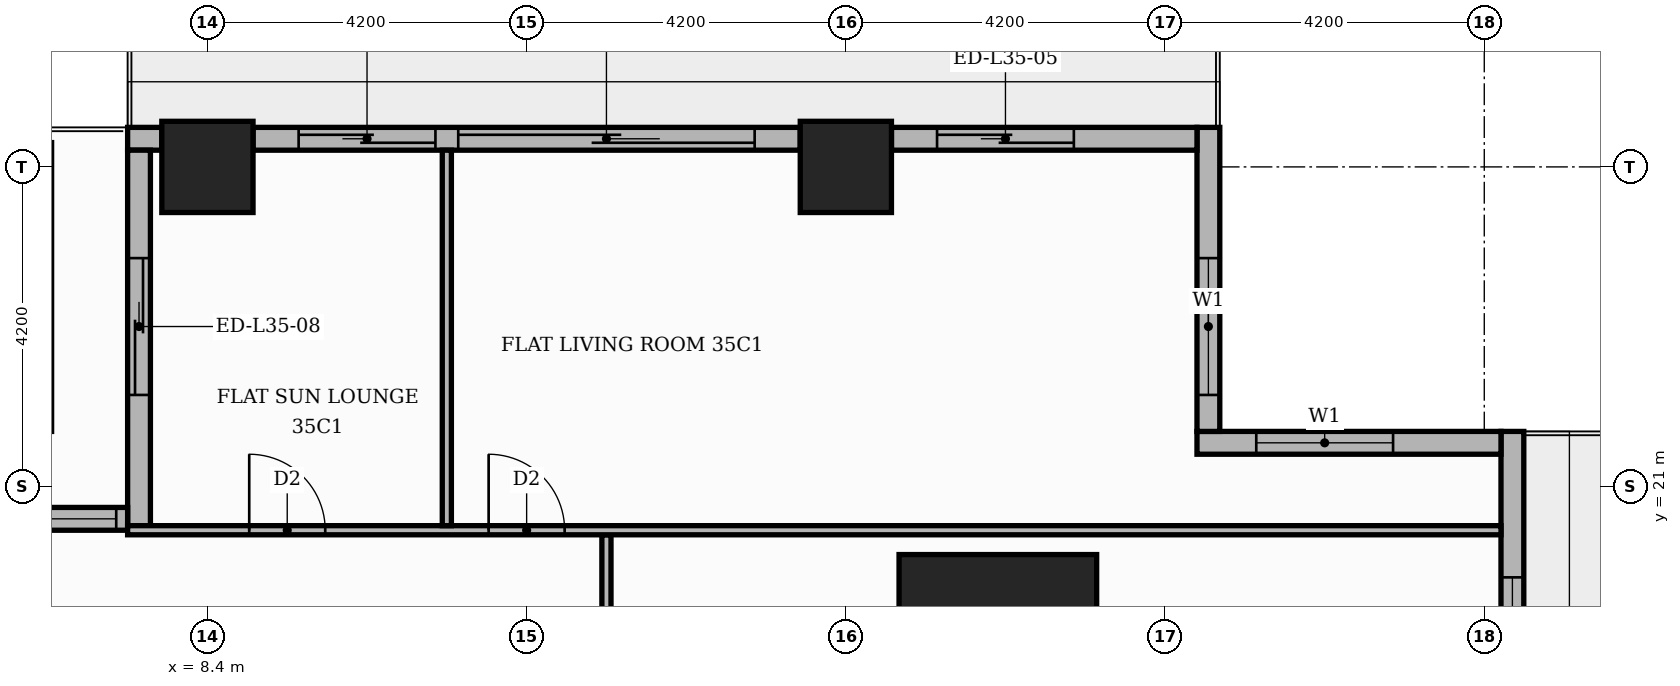
"""IFC4 building model, lengths in metres.
Left out: names, types, materials, properties, quantities, classifications, styles, units other than length and angle.
Written with IfcOpenShell. Run it as: python <this file> out.ifc"""

import sys

from ifc_helpers import new_model, si_unit, direction, frame, frame_2d, origin, origin_2d, place, context, subcontext, project, spatial, rectangle, extrude, element, fill, save


model = new_model("IFC4")
c1 = context("Model", 3, precision=1e-05, world=origin(), true_north=direction((0.0, 1.0)))
c2 = subcontext(c1, "Body", "Model", "MODEL_VIEW")
j1 = project(units=[si_unit("LENGTHUNIT", "METRE"), si_unit("PLANEANGLEUNIT", "RADIAN")], contexts=[c1])
p1 = place(None, origin())
s1 = spatial("IfcSite", under=j1, at=p1, CompositionType="ELEMENT")
p2 = place(p1, origin())
s2 = spatial("IfcBuilding", under=s1, at=p2, CompositionType="ELEMENT")
p3 = place(p2, frame((0.0, 0.0, 149.4)))
s3 = spatial("IfcBuildingStorey", under=s2, at=p3, CompositionType="ELEMENT", Elevation=149.4)
p4 = place(p3, frame((18.8, 18.8, 0.0), z_axis=(0.0, 0.0, 1.0), x_axis=(1.0, 0.0, 0.0)))
e1 = element("IfcColumn", 1, at=p4, inside=s3, PredefinedType="COLUMN", context=c2, shape_type="SweptSolid", body=[
    extrude(rectangle(XDim=2.6, YDim=2.6, at=origin_2d()), origin(), (0.0, 0.0, 1.0), 3.9),
])
for number, where, z_axis, x_axis in (
    (2, (8.4, 25.2, 0.0), (0.0, 0.0, 1.0), (1.0, 0.0, 0.0)),
    (3, (16.8, 25.2, 0.0), (0.0, 0.0, 1.0), (1.0, 0.0, 0.0)),
):
    element("IfcColumn", number, at=place(p3, frame(where, z_axis=z_axis, x_axis=x_axis)), inside=s3, PredefinedType="COLUMN", context=c2, shape_type="SweptSolid", body=[
        extrude(rectangle(XDim=1.2, YDim=1.2, at=origin_2d()), origin(), (0.0, 0.0, 1.0), 3.9),
    ])
p5 = place(p3, frame((25.57, 17.4, 0.0), z_axis=(0.0, 0.0, 1.0), x_axis=(0.0, 1.0, 0.0)))
e4 = element("IfcWall", 4, at=p5, inside=s3, PredefinedType="STANDARD", context=c2, shape_type="SweptSolid", body=[
    extrude(rectangle(XDim=4.32, YDim=0.3, at=frame_2d((2.16, 0.0))), origin(), (0.0, 0.0, 1.0), 3.48),
])
p6 = place(p5, frame((0.6, 0.0, 0.9)))
e5 = element("IfcOpeningElement", 5, at=p6, cuts=e4, PredefinedType="OPENING", context=c2, shape_type="SweptSolid", body=[
    extrude(rectangle(XDim=1.8, YDim=2.1, at=frame_2d((0.9, 1.05))), frame((0.0, 0.16, 0.0), z_axis=(0.0, -1.0, 0.0), x_axis=(1.0, 0.0, 0.0)), (0.0, 0.0, 1.0), 0.32),
])
p7 = place(p3, frame((25.42, 21.57, 0.0), z_axis=(0.0, 0.0, 1.0), x_axis=(-1.0, 0.0, 0.0)))
e6 = element("IfcWall", 6, at=p7, inside=s3, PredefinedType="STANDARD", context=c2, shape_type="SweptSolid", body=[
    extrude(rectangle(XDim=4.0, YDim=0.3, at=frame_2d((2.0, 0.0))), origin(), (0.0, 0.0, 1.0), 3.48),
])
p8 = place(p7, frame((1.42, 0.0, 0.9)))
e7 = element("IfcOpeningElement", 7, at=p8, cuts=e6, PredefinedType="OPENING", context=c2, shape_type="SweptSolid", body=[
    extrude(rectangle(XDim=1.8, YDim=2.1, at=frame_2d((0.9, 1.05))), frame((0.0, 0.16, 0.0), z_axis=(0.0, -1.0, 0.0), x_axis=(1.0, 0.0, 0.0)), (0.0, 0.0, 1.0), 0.32),
])
p9 = place(p3, frame((21.57, 21.72, 0.0), z_axis=(0.0, 0.0, 1.0), x_axis=(0.0, 1.0, 0.0)))
e8 = element("IfcWall", 8, at=p9, inside=s3, PredefinedType="STANDARD", context=c2, shape_type="SweptSolid", body=[
    extrude(rectangle(XDim=4.0, YDim=0.3, at=frame_2d((2.0, 0.0))), origin(), (0.0, 0.0, 1.0), 3.48),
])
p10 = place(p9, frame((0.48, 0.0, 0.9)))
e9 = element("IfcOpeningElement", 9, at=p10, cuts=e8, PredefinedType="OPENING", context=c2, shape_type="SweptSolid", body=[
    extrude(rectangle(XDim=1.8, YDim=2.1, at=frame_2d((0.9, 1.05))), frame((0.0, 0.16, 0.0), z_axis=(0.0, -1.0, 0.0), x_axis=(1.0, 0.0, 0.0)), (0.0, 0.0, 1.0), 0.32),
])
p11 = place(p3, frame((21.42, 25.57, 0.0), z_axis=(0.0, 0.0, 1.0), x_axis=(-1.0, 0.0, 0.0)))
e10 = element("IfcWall", 10, at=p11, inside=s3, PredefinedType="STANDARD", context=c2, shape_type="SweptSolid", body=[
    extrude(rectangle(XDim=4.02, YDim=0.3, at=frame_2d((2.01, 0.0))), origin(), (0.0, 0.0, 1.0), 3.48),
])
p12 = place(p11, frame((1.62, 0.0, 0.0)))
e11 = element("IfcOpeningElement", 11, at=p12, cuts=e10, PredefinedType="OPENING", context=c2, shape_type="SweptSolid", body=[
    extrude(rectangle(XDim=1.8, YDim=2.4, at=frame_2d((0.9, 1.2))), frame((0.0, 0.16, 0.0), z_axis=(0.0, -1.0, 0.0), x_axis=(1.0, 0.0, 0.0)), (0.0, 0.0, 1.0), 0.32),
])
p13 = place(p3, frame((16.2, 25.57, 0.0), z_axis=(0.0, 0.0, 1.0), x_axis=(-1.0, 0.0, 0.0)))
e12 = element("IfcWall", 12, at=p13, inside=s3, PredefinedType="STANDARD", context=c2, shape_type="SweptSolid", body=[
    extrude(rectangle(XDim=7.2, YDim=0.3, at=frame_2d((3.6, 0.0))), origin(), (0.0, 0.0, 1.0), 3.48),
])
p14 = place(p13, frame((0.6, 0.0, 0.0)))
e13 = element("IfcOpeningElement", 13, at=p14, cuts=e12, PredefinedType="OPENING", context=c2, shape_type="SweptSolid", body=[
    extrude(rectangle(XDim=3.9, YDim=2.4, at=frame_2d((1.95, 1.2))), frame((0.0, 0.16, 0.0), z_axis=(0.0, -1.0, 0.0), x_axis=(1.0, 0.0, 0.0)), (0.0, 0.0, 1.0), 0.32),
])
p15 = place(p13, frame((4.8, 0.0, 0.0)))
e14 = element("IfcOpeningElement", 14, at=p15, cuts=e12, PredefinedType="OPENING", context=c2, shape_type="SweptSolid", body=[
    extrude(rectangle(XDim=1.8, YDim=2.4, at=frame_2d((0.9, 1.2))), frame((0.0, 0.16, 0.0), z_axis=(0.0, -1.0, 0.0), x_axis=(1.0, 0.0, 0.0)), (0.0, 0.0, 1.0), 0.32),
])
p16 = place(p3, frame((7.8, 25.57, 0.0), z_axis=(0.0, 0.0, 1.0), x_axis=(-1.0, 0.0, 0.0)))
e15 = element("IfcWall", 15, at=p16, inside=s3, PredefinedType="STANDARD", context=c2, shape_type="SweptSolid", body=[
    extrude(rectangle(XDim=0.45, YDim=0.3, at=frame_2d((0.225, 0.0))), origin(), (0.0, 0.0, 1.0), 3.48),
])
p17 = place(p3, frame((7.5, 25.42, 0.0), z_axis=(0.0, 0.0, 1.0), x_axis=(0.0, -1.0, 0.0)))
e16 = element("IfcWall", 16, at=p17, inside=s3, PredefinedType="STANDARD", context=c2, shape_type="SweptSolid", body=[
    extrude(rectangle(XDim=5.0, YDim=0.3, at=frame_2d((2.5, 0.0))), origin(), (0.0, 0.0, 1.0), 3.48),
])
p18 = place(p17, frame((1.42, 0.0, 0.0)))
e17 = element("IfcOpeningElement", 17, at=p18, cuts=e16, PredefinedType="OPENING", context=c2, shape_type="SweptSolid", body=[
    extrude(rectangle(XDim=1.8, YDim=2.4, at=frame_2d((0.9, 1.2))), frame((0.0, 0.16, 0.0), z_axis=(0.0, -1.0, 0.0), x_axis=(1.0, 0.0, 0.0)), (0.0, 0.0, 1.0), 0.32),
])
p19 = place(p3, frame((7.35, 20.57, 0.0), z_axis=(0.0, 0.0, 1.0), x_axis=(-1.0, 0.0, 0.0)))
e18 = element("IfcWall", 18, at=p19, inside=s3, PredefinedType="STANDARD", context=c2, shape_type="SweptSolid", body=[
    extrude(rectangle(XDim=15.0, YDim=0.3, at=frame_2d((7.5, 0.0))), origin(), (0.0, 0.0, 1.0), 3.48),
])
p20 = place(p19, frame((0.15, 0.0, 0.9)))
e19 = element("IfcOpeningElement", 19, at=p20, cuts=e18, PredefinedType="OPENING", context=c2, shape_type="SweptSolid", body=[
    extrude(rectangle(XDim=6.0, YDim=2.1, at=frame_2d((3.0, 1.05))), frame((0.0, 0.16, 0.0), z_axis=(0.0, -1.0, 0.0), x_axis=(1.0, 0.0, 0.0)), (0.0, 0.0, 1.0), 0.32),
])
p21 = place(p19, frame((6.45, 0.0, 0.9)))
e20 = element("IfcOpeningElement", 20, at=p21, cuts=e18, PredefinedType="OPENING", context=c2, shape_type="SweptSolid", body=[
    extrude(rectangle(XDim=6.0, YDim=2.1, at=frame_2d((3.0, 1.05))), frame((0.0, 0.16, 0.0), z_axis=(0.0, -1.0, 0.0), x_axis=(1.0, 0.0, 0.0)), (0.0, 0.0, 1.0), 0.32),
])
p22 = place(p19, frame((12.75, 0.0, 0.9)))
e21 = element("IfcOpeningElement", 21, at=p22, cuts=e18, PredefinedType="OPENING", context=c2, shape_type="SweptSolid", body=[
    extrude(rectangle(XDim=1.8, YDim=2.1, at=frame_2d((0.9, 1.05))), frame((0.0, 0.16, 0.0), z_axis=(0.0, -1.0, 0.0), x_axis=(1.0, 0.0, 0.0)), (0.0, 0.0, 1.0), 0.32),
])
p23 = place(p3, frame((13.65, 13.75, 0.0), z_axis=(0.0, 0.0, 1.0), x_axis=(0.0, 1.0, 0.0)))
e22 = element("IfcWall", 22, at=p23, inside=s3, PredefinedType="PARTITIONING", context=c2, shape_type="SweptSolid", body=[
    extrude(rectangle(XDim=6.61, YDim=0.12, at=frame_2d((3.305, 0.0))), origin(), (0.0, 0.0, 1.0), 3.48),
])
p24 = place(p23, frame((2.835, 0.0, 0.0)))
e23 = element("IfcOpeningElement", 23, at=p24, cuts=e22, PredefinedType="OPENING", context=c2, shape_type="SweptSolid", body=[
    extrude(rectangle(XDim=0.9, YDim=2.1, at=frame_2d((0.45, 1.05))), frame((0.0, 0.07, 0.0), z_axis=(0.0, -1.0, 0.0), x_axis=(1.0, 0.0, 0.0)), (0.0, 0.0, 1.0), 0.14),
])
p25 = place(p3, frame((7.35, 20.42, 0.0), z_axis=(0.0, 0.0, 1.0), x_axis=(1.0, 0.0, 0.0)))
e24 = element("IfcWall", 24, at=p25, inside=s3, PredefinedType="PARTITIONING", context=c2, shape_type="SweptSolid", body=[
    extrude(rectangle(XDim=18.07, YDim=0.12, at=frame_2d((9.035, 0.0))), origin(), (0.0, 0.0, 1.0), 3.48),
])
p26 = place(p25, frame((4.75, 0.0, 0.0)))
e25 = element("IfcOpeningElement", 25, at=p26, cuts=e24, PredefinedType="OPENING", context=c2, shape_type="SweptSolid", body=[
    extrude(rectangle(XDim=1.0, YDim=2.1, at=frame_2d((0.5, 1.05))), frame((0.0, 0.07, 0.0), z_axis=(0.0, -1.0, 0.0), x_axis=(1.0, 0.0, 0.0)), (0.0, 0.0, 1.0), 0.14),
])
p27 = place(p25, frame((1.6, 0.0, 0.0)))
e26 = element("IfcOpeningElement", 26, at=p27, cuts=e24, PredefinedType="OPENING", context=c2, shape_type="SweptSolid", body=[
    extrude(rectangle(XDim=1.0, YDim=2.1, at=frame_2d((0.5, 1.05))), frame((0.0, 0.07, 0.0), z_axis=(0.0, -1.0, 0.0), x_axis=(1.0, 0.0, 0.0)), (0.0, 0.0, 1.0), 0.14),
])
p28 = place(p3, frame((11.55, 20.48, 0.0), z_axis=(0.0, 0.0, 1.0), x_axis=(0.0, 1.0, 0.0)))
e27 = element("IfcWall", 27, at=p28, inside=s3, PredefinedType="PARTITIONING", context=c2, shape_type="SweptSolid", body=[
    extrude(rectangle(XDim=4.94, YDim=0.12, at=frame_2d((2.47, 0.0))), origin(), (0.0, 0.0, 1.0), 3.48),
])
p29 = place(p6, origin())
e28 = element("IfcWindow", 28, at=p29, inside=s3, PartitioningType="SINGLE_PANEL", PredefinedType="WINDOW", context=c2, shape_type="SweptSolid", body=[
    extrude(rectangle(XDim=1.8, YDim=2.1, at=frame_2d((0.9, 1.05))), frame((0.0, 0.03, 0.0), z_axis=(0.0, -1.0, 0.0), x_axis=(1.0, 0.0, 0.0)), (0.0, 0.0, 1.0), 0.06),
])
fill(e5, e28)
p30 = place(p8, origin())
e29 = element("IfcWindow", 29, at=p30, inside=s3, PartitioningType="SINGLE_PANEL", PredefinedType="WINDOW", context=c2, shape_type="SweptSolid", body=[
    extrude(rectangle(XDim=1.8, YDim=2.1, at=frame_2d((0.9, 1.05))), frame((0.0, 0.03, 0.0), z_axis=(0.0, -1.0, 0.0), x_axis=(1.0, 0.0, 0.0)), (0.0, 0.0, 1.0), 0.06),
])
fill(e7, e29)
p31 = place(p10, origin())
e30 = element("IfcWindow", 30, at=p31, inside=s3, PartitioningType="SINGLE_PANEL", PredefinedType="WINDOW", context=c2, shape_type="SweptSolid", body=[
    extrude(rectangle(XDim=1.8, YDim=2.1, at=frame_2d((0.9, 1.05))), frame((0.0, 0.03, 0.0), z_axis=(0.0, -1.0, 0.0), x_axis=(1.0, 0.0, 0.0)), (0.0, 0.0, 1.0), 0.06),
])
fill(e9, e30)
p32 = place(p12, origin())
e31 = element("IfcDoor", 31, at=p32, inside=s3, OperationType="SLIDING_TO_RIGHT", PredefinedType="DOOR", context=c2, shape_type="SweptSolid", body=[
    extrude(rectangle(XDim=1.8, YDim=2.4, at=frame_2d((0.9, 1.2))), frame((0.0, 0.025, 0.0), z_axis=(0.0, -1.0, 0.0), x_axis=(1.0, 0.0, 0.0)), (0.0, 0.0, 1.0), 0.05),
])
fill(e11, e31)
p33 = place(p14, origin())
e32 = element("IfcDoor", 32, at=p33, inside=s3, OperationType="SLIDING_TO_LEFT", PredefinedType="DOOR", context=c2, shape_type="SweptSolid", body=[
    extrude(rectangle(XDim=3.9, YDim=2.4, at=frame_2d((1.95, 1.2))), frame((0.0, 0.025, 0.0), z_axis=(0.0, -1.0, 0.0), x_axis=(1.0, 0.0, 0.0)), (0.0, 0.0, 1.0), 0.05),
])
fill(e13, e32)
p34 = place(p15, origin())
e33 = element("IfcDoor", 33, at=p34, inside=s3, OperationType="SLIDING_TO_RIGHT", PredefinedType="DOOR", context=c2, shape_type="SweptSolid", body=[
    extrude(rectangle(XDim=1.8, YDim=2.4, at=frame_2d((0.9, 1.2))), frame((0.0, 0.025, 0.0), z_axis=(0.0, -1.0, 0.0), x_axis=(1.0, 0.0, 0.0)), (0.0, 0.0, 1.0), 0.05),
])
fill(e14, e33)
p35 = place(p18, origin())
e34 = element("IfcDoor", 34, at=p35, inside=s3, OperationType="SLIDING_TO_LEFT", PredefinedType="DOOR", context=c2, shape_type="SweptSolid", body=[
    extrude(rectangle(XDim=1.8, YDim=2.4, at=frame_2d((0.9, 1.2))), frame((0.0, 0.025, 0.0), z_axis=(0.0, -1.0, 0.0), x_axis=(1.0, 0.0, 0.0)), (0.0, 0.0, 1.0), 0.05),
])
fill(e17, e34)
p36 = place(p20, origin())
e35 = element("IfcWindow", 35, at=p36, inside=s3, PartitioningType="SINGLE_PANEL", PredefinedType="WINDOW", context=c2, shape_type="SweptSolid", body=[
    extrude(rectangle(XDim=6.0, YDim=2.1, at=frame_2d((3.0, 1.05))), frame((0.0, 0.03, 0.0), z_axis=(0.0, -1.0, 0.0), x_axis=(1.0, 0.0, 0.0)), (0.0, 0.0, 1.0), 0.06),
])
fill(e19, e35)
p37 = place(p26, origin())
e36 = element("IfcDoor", 36, at=p37, inside=s3, OperationType="SINGLE_SWING_LEFT", PredefinedType="DOOR", context=c2, shape_type="SweptSolid", body=[
    extrude(rectangle(XDim=1.0, YDim=2.1, at=frame_2d((0.5, 1.05))), frame((0.0, 0.025, 0.0), z_axis=(0.0, -1.0, 0.0), x_axis=(1.0, 0.0, 0.0)), (0.0, 0.0, 1.0), 0.05),
])
fill(e25, e36)
p38 = place(p27, origin())
e37 = element("IfcDoor", 37, at=p38, inside=s3, OperationType="SINGLE_SWING_LEFT", PredefinedType="DOOR", context=c2, shape_type="SweptSolid", body=[
    extrude(rectangle(XDim=1.0, YDim=2.1, at=frame_2d((0.5, 1.05))), frame((0.0, 0.025, 0.0), z_axis=(0.0, -1.0, 0.0), x_axis=(1.0, 0.0, 0.0)), (0.0, 0.0, 1.0), 0.05),
])
fill(e26, e37)
save(model, sys.argv[1])
